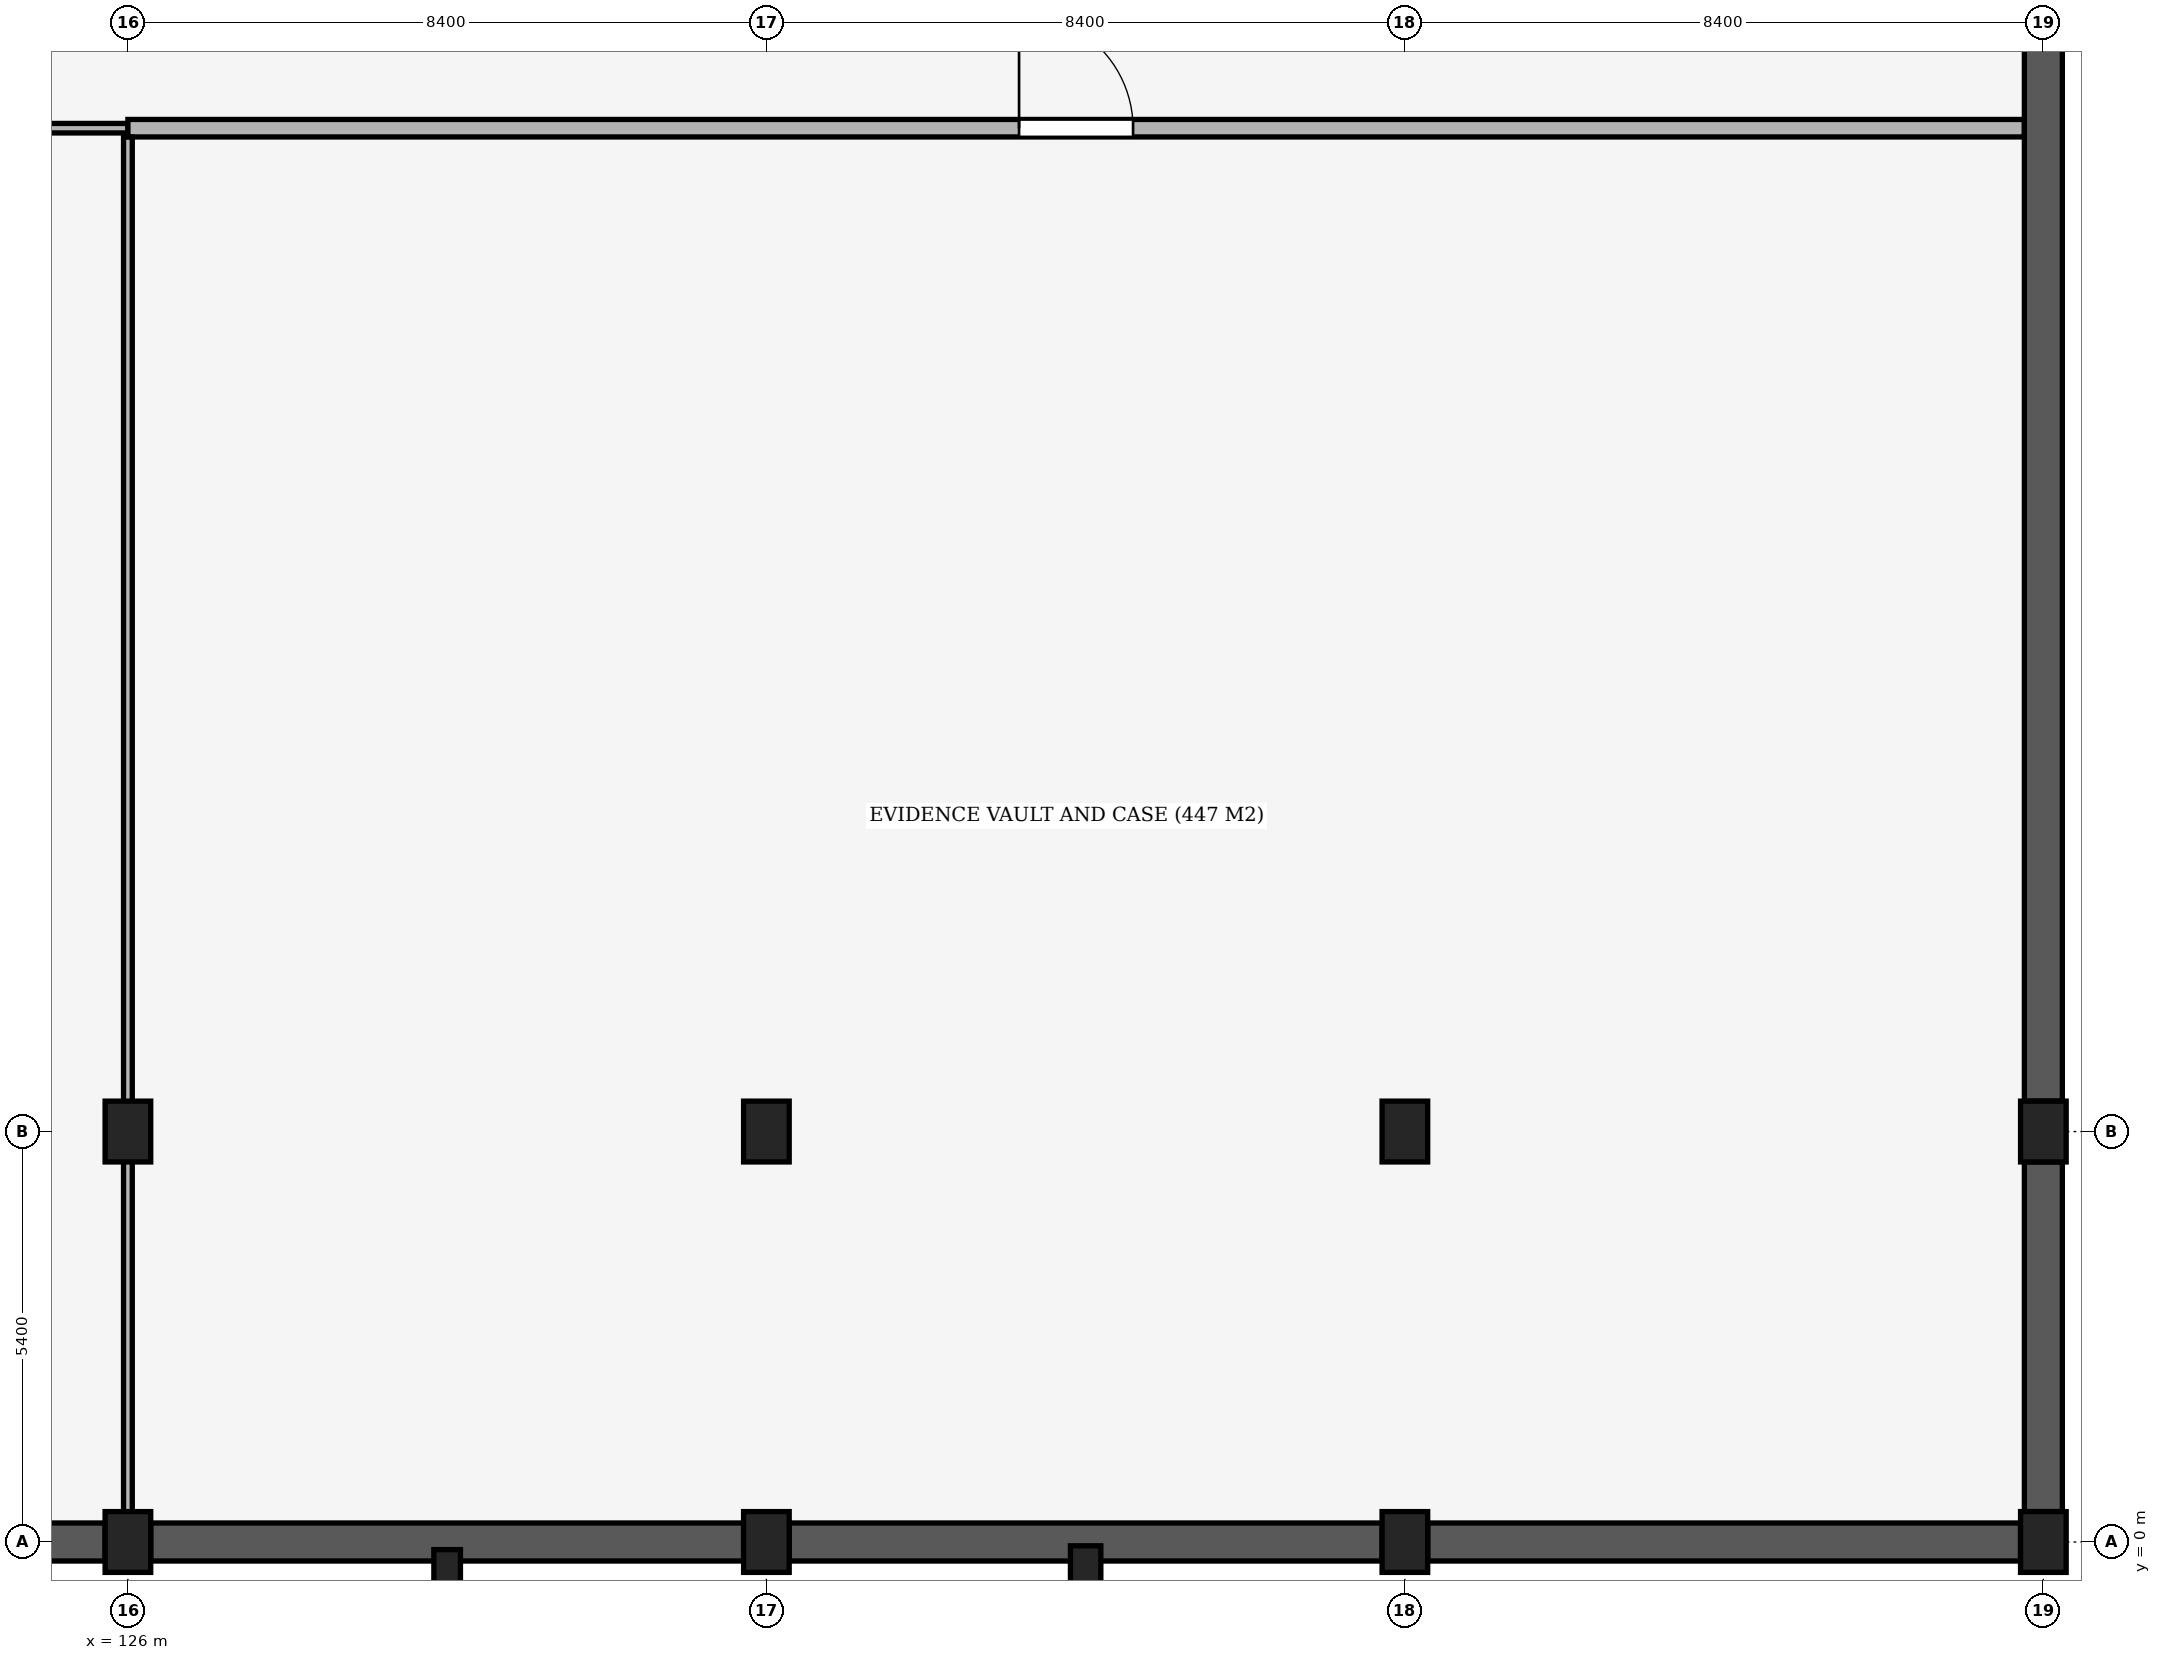
"""IFC4 building model, lengths in metres.
Left out: names, types, materials, properties, quantities, classifications, styles, units other than length and angle.
Written with IfcOpenShell. Run it as: python <this file> out.ifc"""

import sys

from ifc_helpers import new_model, si_unit, direction, frame, frame_2d, origin, origin_2d, place, context, subcontext, project, spatial, rectangle, extrude, element, fill, save


model = new_model("IFC4")
c1 = context("Model", 3, precision=1e-05, world=origin(), true_north=direction((0.0, 1.0)))
c2 = subcontext(c1, "Body", "Model", "MODEL_VIEW")
j1 = project(units=[si_unit("LENGTHUNIT", "METRE"), si_unit("PLANEANGLEUNIT", "RADIAN")], contexts=[c1])
p1 = place(None, origin())
s1 = spatial("IfcSite", under=j1, at=p1, CompositionType="ELEMENT")
p2 = place(p1, origin())
s2 = spatial("IfcBuilding", under=s1, at=p2, CompositionType="ELEMENT")
p3 = place(p2, frame((0.0, 0.0, -4.8)))
s3 = spatial("IfcBuildingStorey", under=s2, at=p3, CompositionType="ELEMENT", Elevation=-4.8)
for number, where, z_axis, x_axis in (
    (1, (126.0, 0.0, 0.0), (0.0, 0.0, 1.0), (1.0, 0.0, 0.0)),
    (2, (126.0, 5.4, 0.0), (0.0, 0.0, 1.0), (1.0, 0.0, 0.0)),
    (3, (134.4, 0.0, 0.0), (0.0, 0.0, 1.0), (1.0, 0.0, 0.0)),
    (4, (134.4, 5.4, 0.0), (0.0, 0.0, 1.0), (1.0, 0.0, 0.0)),
    (5, (142.8, 0.0, 0.0), (0.0, 0.0, 1.0), (1.0, 0.0, 0.0)),
    (6, (142.8, 5.4, 0.0), (0.0, 0.0, 1.0), (1.0, 0.0, 0.0)),
    (7, (151.2, 0.0, 0.0), (0.0, 0.0, 1.0), (1.0, 0.0, 0.0)),
    (8, (151.2, 5.4, 0.0), (0.0, 0.0, 1.0), (1.0, 0.0, 0.0)),
):
    element("IfcColumn", number, at=place(p3, frame(where, z_axis=z_axis, x_axis=x_axis)), inside=s3, PredefinedType="COLUMN", context=c2, shape_type="SweptSolid", body=[
        extrude(rectangle(XDim=0.6, YDim=0.8, at=origin_2d()), origin(), (0.0, 0.0, 1.0), 4.8),
    ])
p4 = place(p3, frame((130.2, -0.35, 0.0), z_axis=(0.0, 0.0, 1.0), x_axis=(1.0, 0.0, 0.0)))
e9 = element("IfcColumn", 9, at=p4, inside=s3, PredefinedType="PILASTER", context=c2, shape_type="SweptSolid", body=[
    extrude(rectangle(XDim=0.35, YDim=0.5, at=origin_2d()), origin(), (0.0, 0.0, 1.0), 4.8),
])
p5 = place(p3, frame((138.6, -0.35, 0.0), z_axis=(0.0, 0.0, 1.0), x_axis=(1.0, 0.0, 0.0)))
e10 = element("IfcColumn", 10, at=p5, inside=s3, PredefinedType="PILASTER", context=c2, shape_type="SweptSolid", body=[
    extrude(rectangle(XDim=0.4, YDim=0.6, at=origin_2d()), origin(), (0.0, 0.0, 1.0), 4.8),
])
p6 = place(p3, frame((150.9, 0.0, 0.0), z_axis=(0.0, 0.0, 1.0), x_axis=(-1.0, 0.0, 0.0)))
e11 = element("IfcWall", 11, at=p6, inside=s3, PredefinedType="USERDEFINED", context=c2, shape_type="SweptSolid", body=[
    extrude(rectangle(XDim=7.8, YDim=0.5, at=frame_2d((3.9, 0.0))), origin(), (0.0, 0.0, 1.0), 3.75),
])
for number, where, z_axis, x_axis in (
    (12, (142.5, 0.0, 0.0), (0.0, 0.0, 1.0), (-1.0, 0.0, 0.0)),
    (13, (134.1, 0.0, 0.0), (0.0, 0.0, 1.0), (-1.0, 0.0, 0.0)),
    (14, (125.7, 0.0, 0.0), (0.0, 0.0, 1.0), (-1.0, 0.0, 0.0)),
):
    element("IfcWall", number, at=place(p3, frame(where, z_axis=z_axis, x_axis=x_axis)), inside=s3, PredefinedType="USERDEFINED", context=c2, shape_type="SweptSolid", body=[
        extrude(rectangle(XDim=7.8, YDim=0.5, at=frame_2d((3.9, 0.0))), origin(), (0.0, 0.0, 1.0), 3.75),
    ])
p7 = place(p3, frame((151.2, 21.8, 0.0), z_axis=(0.0, 0.0, 1.0), x_axis=(0.0, -1.0, 0.0)))
e15 = element("IfcWall", 15, at=p7, inside=s3, PredefinedType="USERDEFINED", context=c2, shape_type="SweptSolid", body=[
    extrude(rectangle(XDim=16.0, YDim=0.5, at=frame_2d((8.0, 0.0))), origin(), (0.0, 0.0, 1.0), 3.35),
])
p8 = place(p3, frame((151.2, 5.0, 0.0), z_axis=(0.0, 0.0, 1.0), x_axis=(0.0, -1.0, 0.0)))
e16 = element("IfcWall", 16, at=p8, inside=s3, PredefinedType="USERDEFINED", context=c2, shape_type="SweptSolid", body=[
    extrude(rectangle(XDim=4.6, YDim=0.5, at=frame_2d((2.3, 0.0))), origin(), (0.0, 0.0, 1.0), 3.85),
])
p9 = place(p3, frame((109.452, 18.6, 0.0), z_axis=(0.0, 0.0, 1.0), x_axis=(1.0, 0.0, 0.0)))
e17 = element("IfcWall", 17, at=p9, inside=s3, PredefinedType="PARTITIONING", context=c2, shape_type="SweptSolid", body=[
    extrude(rectangle(XDim=16.548, YDim=0.125, at=frame_2d((8.274, 0.0))), origin(), (0.0, 0.0, 1.0), 3.35),
])
p10 = place(p9, frame((7.524, 0.0, 0.0)))
e18 = element("IfcOpeningElement", 18, at=p10, cuts=e17, PredefinedType="OPENING", context=c2, shape_type="SweptSolid", body=[
    extrude(rectangle(XDim=1.5, YDim=2.2, at=frame_2d((0.75, 1.1))), frame((0.0, 0.077, 0.0), z_axis=(0.0, -1.0, 0.0), x_axis=(1.0, 0.0, 0.0)), (0.0, 0.0, 1.0), 0.155),
])
p11 = place(p3, frame((126.0, 18.6, 0.0), z_axis=(0.0, 0.0, 1.0), x_axis=(1.0, 0.0, 0.0)))
e19 = element("IfcWall", 19, at=p11, inside=s3, PredefinedType="SOLIDWALL", context=c2, shape_type="SweptSolid", body=[
    extrude(rectangle(XDim=24.948, YDim=0.23, at=frame_2d((12.474, 0.0))), origin(), (0.0, 0.0, 1.0), 3.35),
])
p12 = place(p11, frame((11.724, 0.0, 0.0)))
e20 = element("IfcOpeningElement", 20, at=p12, cuts=e19, PredefinedType="OPENING", context=c2, shape_type="SweptSolid", body=[
    extrude(rectangle(XDim=1.5, YDim=2.2, at=frame_2d((0.75, 1.1))), frame((0.0, 0.13, 0.0), z_axis=(0.0, -1.0, 0.0), x_axis=(1.0, 0.0, 0.0)), (0.0, 0.0, 1.0), 0.26),
])
p13 = place(p3, frame((126.0, 0.066, 0.0), z_axis=(0.0, 0.0, 1.0), x_axis=(0.0, 1.0, 0.0)))
e21 = element("IfcWall", 21, at=p13, inside=s3, PredefinedType="PARTITIONING", context=c2, shape_type="SweptSolid", body=[
    extrude(rectangle(XDim=18.417, YDim=0.115, at=frame_2d((9.208, 0.0))), origin(), (0.0, 0.0, 1.0), 3.35),
])
p14 = place(p12, origin())
e22 = element("IfcDoor", 22, at=p14, inside=s3, OperationType="SINGLE_SWING_LEFT", PredefinedType="DOOR", context=c2, shape_type="SweptSolid", body=[
    extrude(rectangle(XDim=1.5, YDim=2.2, at=frame_2d((0.75, 1.1))), frame((0.0, 0.025, 0.0), z_axis=(0.0, -1.0, 0.0), x_axis=(1.0, 0.0, 0.0)), (0.0, 0.0, 1.0), 0.05),
])
fill(e20, e22)
save(model, sys.argv[1])
